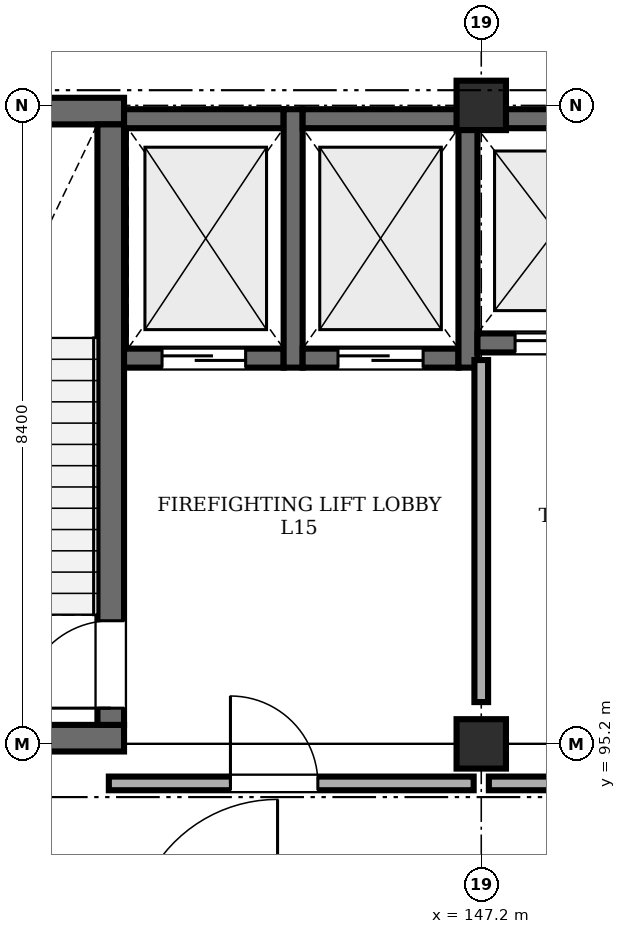
"""IFC4 building model, lengths in metres.
Left out: names, types, materials, properties, quantities, classifications, styles, units other than length and angle.
Written with IfcOpenShell. Run it as: python <this file> out.ifc"""

import sys

from ifc_helpers import new_model, si_unit, direction, frame, frame_2d, origin, origin_2d, place, context, subcontext, project, spatial, rectangle, extrude, element, fill, save


model = new_model("IFC4")
c1 = context("Model", 3, precision=1e-05, world=origin(), true_north=direction((0.0, 1.0)))
c2 = subcontext(c1, "Body", "Model", "MODEL_VIEW")
j1 = project(units=[si_unit("LENGTHUNIT", "METRE"), si_unit("PLANEANGLEUNIT", "RADIAN")], contexts=[c1])
p1 = place(None, origin())
s1 = spatial("IfcSite", under=j1, at=p1, CompositionType="ELEMENT")
p2 = place(p1, origin())
s2 = spatial("IfcBuilding", under=s1, at=p2, CompositionType="ELEMENT")
p3 = place(p2, frame((0.0, 0.0, 61.2)))
s3 = spatial("IfcBuildingStorey", under=s2, at=p3, CompositionType="ELEMENT", Elevation=61.2)
for number, where, z_axis, x_axis in (
    (1, (147.2, 95.2, 0.0), (0.0, 0.0, 1.0), (1.0, 0.0, 0.0)),
    (2, (147.2, 103.6, 0.0), (0.0, 0.0, 1.0), (1.0, 0.0, 0.0)),
):
    element("IfcColumn", number, at=place(p3, frame(where, z_axis=z_axis, x_axis=x_axis)), inside=s3, PredefinedType="COLUMN", context=c2, shape_type="SweptSolid", body=[
        extrude(rectangle(XDim=0.65, YDim=0.65, at=origin_2d()), origin(), (0.0, 0.0, 1.0), 4.28),
    ])
for number, where, z_axis, x_axis in (
    (3, (138.7, 95.275, 0.0), (0.0, 0.0, 1.0), (1.0, 0.0, 0.0)),
    (4, (138.7, 103.525, 0.0), (0.0, 0.0, 1.0), (1.0, 0.0, 0.0)),
):
    element("IfcWall", number, at=place(p3, frame(where, z_axis=z_axis, x_axis=x_axis)), inside=s3, PredefinedType="SHEAR", context=c2, shape_type="SweptSolid", body=[
        extrude(rectangle(XDim=3.8, YDim=0.35, at=frame_2d((1.9, 0.0))), origin(), (0.0, 0.0, 1.0), 4.28),
    ])
p4 = place(p3, frame((142.325, 95.45, 0.0), z_axis=(0.0, 0.0, 1.0), x_axis=(0.0, 1.0, 0.0)))
e5 = element("IfcWall", 5, at=p4, inside=s3, PredefinedType="SHEAR", context=c2, shape_type="SweptSolid", body=[
    extrude(rectangle(XDim=7.9, YDim=0.35, at=frame_2d((3.95, 0.0))), origin(), (0.0, 0.0, 1.0), 4.28),
])
p5 = place(p4, frame((0.22, 0.0, 0.0)))
e6 = element("IfcOpeningElement", 6, at=p5, cuts=e5, PredefinedType="OPENING", context=c2, shape_type="SweptSolid", body=[
    extrude(rectangle(XDim=1.15, YDim=2.15, at=frame_2d((0.575, 1.075))), frame((0.0, 0.185, 0.0), z_axis=(0.0, -1.0, 0.0), x_axis=(1.0, 0.0, 0.0)), (0.0, 0.0, 1.0), 0.37),
])
p6 = place(p3, frame((142.5, 100.275, 0.0), z_axis=(0.0, 0.0, 1.0), x_axis=(1.0, 0.0, 0.0)))
e7 = element("IfcWall", 7, at=p6, inside=s3, PredefinedType="SHEAR", context=c2, shape_type="SweptSolid", body=[
    extrude(rectangle(XDim=2.1, YDim=0.25, at=frame_2d((1.05, 0.0))), origin(), (0.0, 0.0, 1.0), 4.28),
])
p7 = place(p6, frame((0.5, 0.0, 0.0)))
e8 = element("IfcOpeningElement", 8, at=p7, cuts=e7, PredefinedType="OPENING", context=c2, shape_type="SweptSolid", body=[
    extrude(rectangle(XDim=1.1, YDim=2.15, at=frame_2d((0.55, 1.075))), frame((0.0, 0.135, 0.0), z_axis=(0.0, -1.0, 0.0), x_axis=(1.0, 0.0, 0.0)), (0.0, 0.0, 1.0), 0.27),
])
p8 = place(p3, frame((142.5, 103.425, 0.0), z_axis=(0.0, 0.0, 1.0), x_axis=(1.0, 0.0, 0.0)))
e9 = element("IfcWall", 9, at=p8, inside=s3, PredefinedType="SHEAR", context=c2, shape_type="SweptSolid", body=[
    extrude(rectangle(XDim=2.1, YDim=0.25, at=frame_2d((1.05, 0.0))), origin(), (0.0, 0.0, 1.0), 4.28),
])
p9 = place(p3, frame((144.725, 100.15, 0.0), z_axis=(0.0, 0.0, 1.0), x_axis=(0.0, 1.0, 0.0)))
e10 = element("IfcWall", 10, at=p9, inside=s3, PredefinedType="SHEAR", context=c2, shape_type="SweptSolid", body=[
    extrude(rectangle(XDim=3.4, YDim=0.25, at=frame_2d((1.7, 0.0))), origin(), (0.0, 0.0, 1.0), 4.28),
])
p10 = place(p3, frame((144.85, 100.275, 0.0), z_axis=(0.0, 0.0, 1.0), x_axis=(1.0, 0.0, 0.0)))
e11 = element("IfcWall", 11, at=p10, inside=s3, PredefinedType="SHEAR", context=c2, shape_type="SweptSolid", body=[
    extrude(rectangle(XDim=2.05, YDim=0.25, at=frame_2d((1.025, 0.0))), origin(), (0.0, 0.0, 1.0), 4.28),
])
p11 = place(p10, frame((0.465, 0.0, 0.0)))
e12 = element("IfcOpeningElement", 12, at=p11, cuts=e11, PredefinedType="OPENING", context=c2, shape_type="SweptSolid", body=[
    extrude(rectangle(XDim=1.12, YDim=2.15, at=frame_2d((0.56, 1.075))), frame((0.0, 0.135, 0.0), z_axis=(0.0, -1.0, 0.0), x_axis=(1.0, 0.0, 0.0)), (0.0, 0.0, 1.0), 0.27),
])
p12 = place(p3, frame((144.85, 103.425, 0.0), z_axis=(0.0, 0.0, 1.0), x_axis=(1.0, 0.0, 0.0)))
e13 = element("IfcWall", 13, at=p12, inside=s3, PredefinedType="SHEAR", context=c2, shape_type="SweptSolid", body=[
    extrude(rectangle(XDim=2.05, YDim=0.25, at=frame_2d((1.025, 0.0))), origin(), (0.0, 0.0, 1.0), 4.28),
])
p13 = place(p3, frame((147.025, 100.15, 0.0), z_axis=(0.0, 0.0, 1.0), x_axis=(0.0, 1.0, 0.0)))
e14 = element("IfcWall", 14, at=p13, inside=s3, PredefinedType="SHEAR", context=c2, shape_type="SweptSolid", body=[
    extrude(rectangle(XDim=3.4, YDim=0.25, at=frame_2d((1.7, 0.0))), origin(), (0.0, 0.0, 1.0), 4.28),
])
p14 = place(p3, frame((147.15, 100.475, 0.0), z_axis=(0.0, 0.0, 1.0), x_axis=(1.0, 0.0, 0.0)))
e15 = element("IfcWall", 15, at=p14, inside=s3, PredefinedType="SHEAR", context=c2, shape_type="SweptSolid", body=[
    extrude(rectangle(XDim=2.05, YDim=0.25, at=frame_2d((1.025, 0.0))), origin(), (0.0, 0.0, 1.0), 4.28),
])
p15 = place(p14, frame((0.495, 0.0, 0.0)))
e16 = element("IfcOpeningElement", 16, at=p15, cuts=e15, PredefinedType="OPENING", context=c2, shape_type="SweptSolid", body=[
    extrude(rectangle(XDim=1.06, YDim=2.15, at=frame_2d((0.53, 1.075))), frame((0.0, 0.135, 0.0), z_axis=(0.0, -1.0, 0.0), x_axis=(1.0, 0.0, 0.0)), (0.0, 0.0, 1.0), 0.27),
])
p16 = place(p3, frame((147.15, 103.425, 0.0), z_axis=(0.0, 0.0, 1.0), x_axis=(1.0, 0.0, 0.0)))
e17 = element("IfcWall", 17, at=p16, inside=s3, PredefinedType="SHEAR", context=c2, shape_type="SweptSolid", body=[
    extrude(rectangle(XDim=2.05, YDim=0.25, at=frame_2d((1.025, 0.0))), origin(), (0.0, 0.0, 1.0), 4.28),
])
p17 = place(p3, frame((142.3, 94.68, 0.0), z_axis=(0.0, 0.0, 1.0), x_axis=(1.0, 0.0, 0.0)))
e18 = element("IfcWall", 18, at=p17, inside=s3, PredefinedType="STANDARD", context=c2, shape_type="SweptSolid", body=[
    extrude(rectangle(XDim=4.8, YDim=0.18, at=frame_2d((2.4, 0.0))), origin(), (0.0, 0.0, 1.0), 4.28),
])
p18 = place(p17, frame((1.6, 0.0, 0.0)))
e19 = element("IfcOpeningElement", 19, at=p18, cuts=e18, PredefinedType="OPENING", context=c2, shape_type="SweptSolid", body=[
    extrude(rectangle(XDim=1.15, YDim=2.15, at=frame_2d((0.575, 1.075))), frame((0.0, 0.1, 0.0), z_axis=(0.0, -1.0, 0.0), x_axis=(1.0, 0.0, 0.0)), (0.0, 0.0, 1.0), 0.2),
])
p19 = place(p3, frame((147.3, 94.68, 0.0), z_axis=(0.0, 0.0, 1.0), x_axis=(1.0, 0.0, 0.0)))
e20 = element("IfcWall", 20, at=p19, inside=s3, PredefinedType="STANDARD", context=c2, shape_type="SweptSolid", body=[
    extrude(rectangle(XDim=4.85, YDim=0.18, at=frame_2d((2.425, 0.0))), origin(), (0.0, 0.0, 1.0), 4.28),
])
p20 = place(p19, frame((1.6, 0.0, 0.0)))
e21 = element("IfcOpeningElement", 21, at=p20, cuts=e20, PredefinedType="OPENING", context=c2, shape_type="SweptSolid", body=[
    extrude(rectangle(XDim=1.15, YDim=2.15, at=frame_2d((0.575, 1.075))), frame((0.0, 0.1, 0.0), z_axis=(0.0, -1.0, 0.0), x_axis=(1.0, 0.0, 0.0)), (0.0, 0.0, 1.0), 0.2),
])
p21 = place(p3, frame((147.2, 95.75, 0.0), z_axis=(0.0, 0.0, 1.0), x_axis=(0.0, 1.0, 0.0)))
e22 = element("IfcWall", 22, at=p21, inside=s3, PredefinedType="STANDARD", context=c2, shape_type="SweptSolid", body=[
    extrude(rectangle(XDim=4.5, YDim=0.18, at=frame_2d((2.25, 0.0))), origin(), (0.0, 0.0, 1.0), 3.58),
])
p22 = place(p18, origin())
e23 = element("IfcDoor", 23, at=p22, inside=s3, OperationType="SINGLE_SWING_LEFT", PredefinedType="DOOR", context=c2, shape_type="SweptSolid", body=[
    extrude(rectangle(XDim=1.15, YDim=2.15, at=frame_2d((0.575, 1.075))), frame((0.0, 0.025, 0.0), z_axis=(0.0, -1.0, 0.0), x_axis=(1.0, 0.0, 0.0)), (0.0, 0.0, 1.0), 0.05),
])
fill(e19, e23)
p23 = place(p5, origin())
e24 = element("IfcDoor", 24, at=p23, inside=s3, OperationType="SINGLE_SWING_LEFT", PredefinedType="DOOR", context=c2, shape_type="SweptSolid", body=[
    extrude(rectangle(XDim=1.15, YDim=2.15, at=frame_2d((0.575, 1.075))), frame((0.0, 0.025, 0.0), z_axis=(0.0, -1.0, 0.0), x_axis=(1.0, 0.0, 0.0)), (0.0, 0.0, 1.0), 0.05),
])
fill(e6, e24)
p24 = place(p7, origin())
e25 = element("IfcDoor", 25, at=p24, inside=s3, OperationType="SLIDING_TO_LEFT", PredefinedType="DOOR", context=c2, shape_type="SweptSolid", body=[
    extrude(rectangle(XDim=1.1, YDim=2.15, at=frame_2d((0.55, 1.075))), frame((0.0, 0.025, 0.0), z_axis=(0.0, -1.0, 0.0), x_axis=(1.0, 0.0, 0.0)), (0.0, 0.0, 1.0), 0.05),
])
fill(e8, e25)
p25 = place(p11, origin())
e26 = element("IfcDoor", 26, at=p25, inside=s3, OperationType="SLIDING_TO_LEFT", PredefinedType="DOOR", context=c2, shape_type="SweptSolid", body=[
    extrude(rectangle(XDim=1.12, YDim=2.15, at=frame_2d((0.56, 1.075))), frame((0.0, 0.025, 0.0), z_axis=(0.0, -1.0, 0.0), x_axis=(1.0, 0.0, 0.0)), (0.0, 0.0, 1.0), 0.05),
])
fill(e12, e26)
p26 = place(p15, origin())
e27 = element("IfcDoor", 27, at=p26, inside=s3, OperationType="SLIDING_TO_LEFT", PredefinedType="DOOR", context=c2, shape_type="SweptSolid", body=[
    extrude(rectangle(XDim=1.06, YDim=2.15, at=frame_2d((0.53, 1.075))), frame((0.0, 0.025, 0.0), z_axis=(0.0, -1.0, 0.0), x_axis=(1.0, 0.0, 0.0)), (0.0, 0.0, 1.0), 0.05),
])
fill(e16, e27)
save(model, sys.argv[1])
